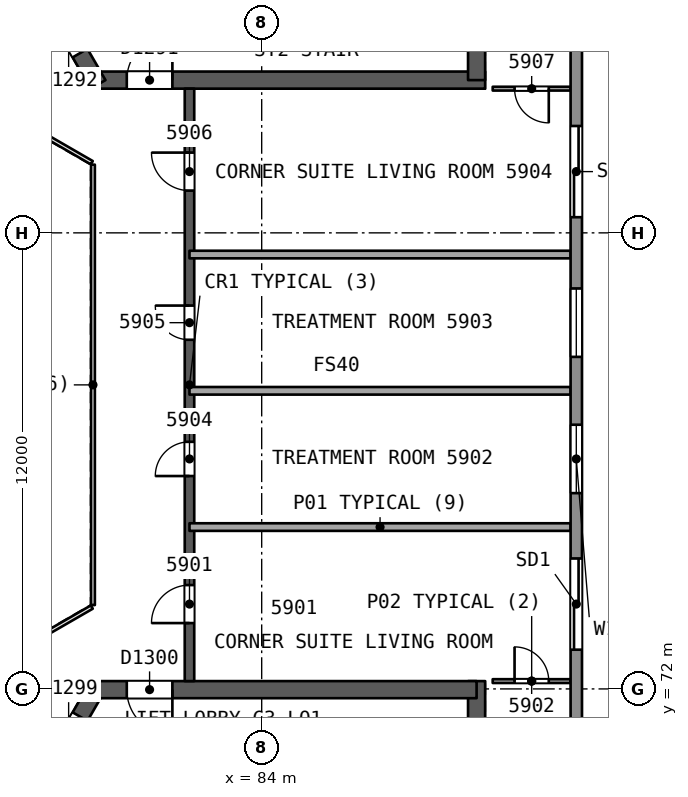
"""IFC4 building model, lengths in metres.
Left out: names, types, materials, properties, quantities, classifications, styles, units other than length and angle.
Written with IfcOpenShell. Run it as: python <this file> out.ifc"""

import sys

from ifc_helpers import new_model, si_unit, direction, frame, frame_2d, origin, place, context, subcontext, project, spatial, rectangle, extrude, element, fill, save


model = new_model("IFC4")
c1 = context("Model", 3, precision=1e-05, world=origin(), true_north=direction((0.0, 1.0)))
c2 = subcontext(c1, "Body", "Model", "MODEL_VIEW")
j1 = project(units=[si_unit("LENGTHUNIT", "METRE"), si_unit("PLANEANGLEUNIT", "RADIAN")], contexts=[c1])
p1 = place(None, origin())
s1 = spatial("IfcSite", under=j1, at=p1, CompositionType="ELEMENT")
p2 = place(p1, origin())
s2 = spatial("IfcBuilding", under=s1, at=p2, CompositionType="ELEMENT")
p3 = place(p2, frame((0.0, 0.0, 239.1)))
s3 = spatial("IfcBuildingStorey", under=s2, at=p3, CompositionType="ELEMENT", Elevation=239.1)
p4 = place(p3, frame((79.63, 88.019, 0.0), z_axis=(0.0, 0.0, 1.0), x_axis=(1.0, 0.0, 0.0)))
e1 = element("IfcWall", 1, at=p4, inside=s3, PredefinedType="SHEAR", context=c2, shape_type="SweptSolid", body=[
    extrude(rectangle(XDim=10.25, YDim=0.45, at=frame_2d((5.125, 0.0))), origin(), (0.0, 0.0, 1.0), 3.7),
])
p5 = place(p4, frame((0.82, 0.0, 0.0)))
e2 = element("IfcOpeningElement", 2, at=p5, cuts=e1, PredefinedType="OPENING", context=c2, shape_type="SweptSolid", body=[
    extrude(rectangle(XDim=1.2, YDim=2.1, at=frame_2d((0.6, 1.05))), frame((0.0, 0.235, 0.0), z_axis=(0.0, -1.0, 0.0), x_axis=(1.0, 0.0, 0.0)), (0.0, 0.0, 1.0), 0.471),
])
p6 = place(p3, frame((89.655, 88.019, 0.0), z_axis=(0.0, 0.0, 1.0), x_axis=(0.0, 1.0, 0.0)))
e3 = element("IfcWall", 3, at=p6, inside=s3, PredefinedType="SHEAR", context=c2, shape_type="SweptSolid", body=[
    extrude(rectangle(XDim=14.108, YDim=0.45, at=frame_2d((7.054, 0.0))), origin(), (0.0, 0.0, 1.0), 3.7),
])
p7 = place(p3, frame((74.617, 96.701, 0.0), z_axis=(0.0, 0.0, 1.0), x_axis=(0.499994385119, -0.866028645513, 0.0)))
e4 = element("IfcWall", 4, at=p7, inside=s3, PredefinedType="SHEAR", context=c2, shape_type="SweptSolid", body=[
    extrude(rectangle(XDim=10.155, YDim=0.45, at=frame_2d((5.077, 0.0))), origin(), (0.0, 0.0, 1.0), 3.7),
])
p8 = place(p7, frame((8.005, 0.0, 0.0)))
e5 = element("IfcOpeningElement", 5, at=p8, cuts=e4, PredefinedType="OPENING", context=c2, shape_type="SweptSolid", body=[
    extrude(rectangle(XDim=1.2, YDim=2.1, at=frame_2d((0.6, 1.05))), frame((0.0, 0.235, 0.0), z_axis=(0.0, -1.0, 0.0), x_axis=(1.0, 0.0, 0.0)), (0.0, 0.0, 1.0), 0.471),
])
p9 = place(p3, frame((79.63, 71.981, 0.0), z_axis=(0.0, 0.0, 1.0), x_axis=(-0.500002171595, -0.86602415001, 0.0)))
e6 = element("IfcWall", 6, at=p9, inside=s3, PredefinedType="SHEAR", context=c2, shape_type="SweptSolid", body=[
    extrude(rectangle(XDim=10.25, YDim=0.45, at=frame_2d((5.125, 0.0))), origin(), (0.0, 0.0, 1.0), 3.7),
])
p10 = place(p9, frame((0.82, 0.0, 0.0)))
e7 = element("IfcOpeningElement", 7, at=p10, cuts=e6, PredefinedType="OPENING", context=c2, shape_type="SweptSolid", body=[
    extrude(rectangle(XDim=1.2, YDim=2.1, at=frame_2d((0.6, 1.05))), frame((0.0, 0.235, 0.0), z_axis=(0.0, -1.0, 0.0), x_axis=(1.0, 0.0, 0.0)), (0.0, 0.0, 1.0), 0.471),
])
p11 = place(p3, frame((89.655, 58.002, 0.0), z_axis=(0.0, 0.0, 1.0), x_axis=(0.0, 1.0, 0.0)))
e8 = element("IfcWall", 8, at=p11, inside=s3, PredefinedType="SHEAR", context=c2, shape_type="SweptSolid", body=[
    extrude(rectangle(XDim=14.204, YDim=0.45, at=frame_2d((7.102, 0.0))), origin(), (0.0, 0.0, 1.0), 3.7),
])
p12 = place(p3, frame((89.655, 71.981, 0.0), z_axis=(0.0, 0.0, 1.0), x_axis=(-1.0, 0.0, 0.0)))
e9 = element("IfcWall", 9, at=p12, inside=s3, PredefinedType="SHEAR", context=c2, shape_type="SweptSolid", body=[
    extrude(rectangle(XDim=10.155, YDim=0.45, at=frame_2d((5.078, 0.0))), origin(), (0.0, 0.0, 1.0), 3.7),
])
p13 = place(p12, frame((8.005, 0.0, 0.0)))
e10 = element("IfcOpeningElement", 10, at=p13, cuts=e9, PredefinedType="OPENING", context=c2, shape_type="SweptSolid", body=[
    extrude(rectangle(XDim=1.2, YDim=2.1, at=frame_2d((0.6, 1.05))), frame((0.0, 0.235, 0.0), z_axis=(0.0, -1.0, 0.0), x_axis=(1.0, 0.0, 0.0)), (0.0, 0.0, 1.0), 0.471),
])
p14 = place(p3, frame((82.1, 72.206, 0.0), z_axis=(0.0, 0.0, 1.0), x_axis=(0.0, 1.0, 0.0)))
e11 = element("IfcWall", 11, at=p14, inside=s3, PredefinedType="SHEAR", context=c2, shape_type="SweptSolid", body=[
    extrude(rectangle(XDim=15.588, YDim=0.25, at=frame_2d((7.794, 0.0))), origin(), (0.0, 0.0, 1.0), 3.3),
])
p15 = place(p14, frame((1.527, 0.0, 0.0)))
e12 = element("IfcOpeningElement", 12, at=p15, cuts=e11, PredefinedType="OPENING", context=c2, shape_type="SweptSolid", body=[
    extrude(rectangle(XDim=1.0, YDim=2.1, at=frame_2d((0.5, 1.05))), frame((0.0, 0.135, 0.0), z_axis=(0.0, -1.0, 0.0), x_axis=(1.0, 0.0, 0.0)), (0.0, 0.0, 1.0), 0.271),
])
p16 = place(p14, frame((5.396, 0.0, 0.0)))
e13 = element("IfcOpeningElement", 13, at=p16, cuts=e11, PredefinedType="OPENING", context=c2, shape_type="SweptSolid", body=[
    extrude(rectangle(XDim=0.9, YDim=2.1, at=frame_2d((0.45, 1.05))), frame((0.0, 0.135, 0.0), z_axis=(0.0, -1.0, 0.0), x_axis=(1.0, 0.0, 0.0)), (0.0, 0.0, 1.0), 0.271),
])
p17 = place(p14, frame((8.981, 0.0, 0.0)))
e14 = element("IfcOpeningElement", 14, at=p17, cuts=e11, PredefinedType="OPENING", context=c2, shape_type="SweptSolid", body=[
    extrude(rectangle(XDim=0.9, YDim=2.1, at=frame_2d((0.45, 1.05))), frame((0.0, 0.135, 0.0), z_axis=(0.0, -1.0, 0.0), x_axis=(1.0, 0.0, 0.0)), (0.0, 0.0, 1.0), 0.271),
])
p18 = place(p14, frame((12.906, 0.0, 0.0)))
e15 = element("IfcOpeningElement", 15, at=p18, cuts=e11, PredefinedType="OPENING", context=c2, shape_type="SweptSolid", body=[
    extrude(rectangle(XDim=1.0, YDim=2.1, at=frame_2d((0.5, 1.05))), frame((0.0, 0.135, 0.0), z_axis=(0.0, -1.0, 0.0), x_axis=(1.0, 0.0, 0.0)), (0.0, 0.0, 1.0), 0.271),
])
p19 = place(p3, frame((90.079, 72.206, 0.0), z_axis=(0.0, 0.0, 1.0), x_axis=(1.0, 0.0, 0.0)))
e16 = element("IfcWall", 16, at=p19, inside=s3, PredefinedType="PARTITIONING", context=c2, shape_type="SweptSolid", body=[
    extrude(rectangle(XDim=2.05, YDim=0.1, at=frame_2d((1.025, 0.0))), origin(), (0.0, 0.0, 1.0), 3.3),
])
p20 = place(p19, frame((0.575, 0.0, 0.0)))
e17 = element("IfcOpeningElement", 17, at=p20, cuts=e16, PredefinedType="OPENING", context=c2, shape_type="SweptSolid", body=[
    extrude(rectangle(XDim=0.9, YDim=2.1, at=frame_2d((0.45, 1.05))), frame((0.0, 0.061, 0.0), z_axis=(0.0, -1.0, 0.0), x_axis=(1.0, 0.0, 0.0)), (0.0, 0.0, 1.0), 0.121),
])
for number, where, z_axis, x_axis in (
    (18, (92.129, 76.259, 0.0), (0.0, 0.0, 1.0), (-1.0, 0.0, 0.0)),
    (19, (92.129, 79.844, 0.0), (0.0, 0.0, 1.0), (-1.0, 0.0, 0.0)),
    (20, (92.129, 83.429, 0.0), (0.0, 0.0, 1.0), (-1.0, 0.0, 0.0)),
):
    element("IfcWall", number, at=place(p3, frame(where, z_axis=z_axis, x_axis=x_axis)), inside=s3, PredefinedType="PARTITIONING", context=c2, shape_type="SweptSolid", body=[
        extrude(rectangle(XDim=10.029, YDim=0.2, at=frame_2d((5.015, 0.0))), origin(), (0.0, 0.0, 1.0), 3.3),
    ])
p21 = place(p3, frame((92.129, 87.794, 0.0), z_axis=(0.0, 0.0, 1.0), x_axis=(-1.0, 0.0, 0.0)))
e21 = element("IfcWall", 21, at=p21, inside=s3, PredefinedType="PARTITIONING", context=c2, shape_type="SweptSolid", body=[
    extrude(rectangle(XDim=2.05, YDim=0.1, at=frame_2d((1.025, 0.0))), origin(), (0.0, 0.0, 1.0), 3.3),
])
p22 = place(p21, frame((0.575, 0.0, 0.0)))
e22 = element("IfcOpeningElement", 22, at=p22, cuts=e21, PredefinedType="OPENING", context=c2, shape_type="SweptSolid", body=[
    extrude(rectangle(XDim=0.9, YDim=2.1, at=frame_2d((0.45, 1.05))), frame((0.0, 0.061, 0.0), z_axis=(0.0, -1.0, 0.0), x_axis=(1.0, 0.0, 0.0)), (0.0, 0.0, 1.0), 0.121),
])
p23 = place(p3, frame((92.279, 104.844, 0.0), z_axis=(0.0, 0.0, 1.0), x_axis=(0.0, -1.0, 0.0)))
e23 = element("IfcWall", 23, at=p23, inside=s3, PredefinedType="SOLIDWALL", context=c2, shape_type="SweptSolid", body=[
    extrude(rectangle(XDim=49.688, YDim=0.3, at=frame_2d((24.844, 0.0))), origin(), (0.0, 0.0, 1.0), 3.3),
])
p24 = place(p23, frame((29.412, 0.0, 0.0)))
e24 = element("IfcOpeningElement", 24, at=p24, cuts=e23, PredefinedType="OPENING", context=c2, shape_type="SweptSolid", body=[
    extrude(rectangle(XDim=2.4, YDim=2.4, at=frame_2d((1.2, 1.2))), frame((0.0, 0.161, 0.0), z_axis=(0.0, -1.0, 0.0), x_axis=(1.0, 0.0, 0.0)), (0.0, 0.0, 1.0), 0.321),
])
p25 = place(p23, frame((38.973, 0.0, 0.0)))
e25 = element("IfcOpeningElement", 25, at=p25, cuts=e23, PredefinedType="OPENING", context=c2, shape_type="SweptSolid", body=[
    extrude(rectangle(XDim=2.4, YDim=2.4, at=frame_2d((1.2, 1.2))), frame((0.0, 0.161, 0.0), z_axis=(0.0, -1.0, 0.0), x_axis=(1.0, 0.0, 0.0)), (0.0, 0.0, 1.0), 0.321),
])
p26 = place(p23, frame((18.032, 0.0, 0.0)))
e26 = element("IfcOpeningElement", 26, at=p26, cuts=e23, PredefinedType="OPENING", context=c2, shape_type="SweptSolid", body=[
    extrude(rectangle(XDim=2.4, YDim=2.4, at=frame_2d((1.2, 1.2))), frame((0.0, 0.161, 0.0), z_axis=(0.0, -1.0, 0.0), x_axis=(1.0, 0.0, 0.0)), (0.0, 0.0, 1.0), 0.321),
])
p27 = place(p23, frame((8.341, 0.0, 0.0)))
e27 = element("IfcOpeningElement", 27, at=p27, cuts=e23, PredefinedType="OPENING", context=c2, shape_type="SweptSolid", body=[
    extrude(rectangle(XDim=2.4, YDim=2.4, at=frame_2d((1.2, 1.2))), frame((0.0, 0.161, 0.0), z_axis=(0.0, -1.0, 0.0), x_axis=(1.0, 0.0, 0.0)), (0.0, 0.0, 1.0), 0.321),
])
p28 = place(p23, frame((25.893, 0.0, 0.9)))
e28 = element("IfcOpeningElement", 28, at=p28, cuts=e23, PredefinedType="OPENING", context=c2, shape_type="SweptSolid", body=[
    extrude(rectangle(XDim=1.8, YDim=1.5, at=frame_2d((0.9, 0.75))), frame((0.0, 0.161, 0.0), z_axis=(0.0, -1.0, 0.0), x_axis=(1.0, 0.0, 0.0)), (0.0, 0.0, 1.0), 0.321),
])
p29 = place(p23, frame((22.307, 0.0, 0.9)))
e29 = element("IfcOpeningElement", 29, at=p29, cuts=e23, PredefinedType="OPENING", context=c2, shape_type="SweptSolid", body=[
    extrude(rectangle(XDim=1.8, YDim=1.5, at=frame_2d((0.9, 0.75))), frame((0.0, 0.161, 0.0), z_axis=(0.0, -1.0, 0.0), x_axis=(1.0, 0.0, 0.0)), (0.0, 0.0, 1.0), 0.321),
])
p30 = place(p3, frame((44.845, 82.542, 0.0), z_axis=(0.0, 0.0, 1.0), x_axis=(0.866025459945, 0.499999902727, 0.0)))
e30 = element("IfcWall", 30, at=p30, inside=s3, PredefinedType="SOLIDWALL", context=c2, shape_type="SweptSolid", body=[
    extrude(rectangle(XDim=49.688, YDim=0.3, at=frame_2d((24.844, 0.0))), origin(), (0.0, 0.0, 1.0), 3.3),
])
p31 = place(p30, frame((23.8, 0.0, 0.0)))
e31 = element("IfcOpeningElement", 31, at=p31, cuts=e30, PredefinedType="OPENING", context=c2, shape_type="SweptSolid", body=[
    extrude(rectangle(XDim=2.4, YDim=2.4, at=frame_2d((1.2, 1.2))), frame((0.0, 0.161, 0.0), z_axis=(0.0, -1.0, 0.0), x_axis=(1.0, 0.0, 0.0)), (0.0, 0.0, 1.0), 0.321),
])
p32 = place(p30, frame((10.243, 0.0, 0.0)))
e32 = element("IfcOpeningElement", 32, at=p32, cuts=e30, PredefinedType="OPENING", context=c2, shape_type="SweptSolid", body=[
    extrude(rectangle(XDim=2.4, YDim=2.4, at=frame_2d((1.2, 1.2))), frame((0.0, 0.161, 0.0), z_axis=(0.0, -1.0, 0.0), x_axis=(1.0, 0.0, 0.0)), (0.0, 0.0, 1.0), 0.321),
])
p33 = place(p30, frame((37.201, 0.0, 0.0)))
e33 = element("IfcOpeningElement", 33, at=p33, cuts=e30, PredefinedType="OPENING", context=c2, shape_type="SweptSolid", body=[
    extrude(rectangle(XDim=2.4, YDim=2.4, at=frame_2d((1.2, 1.2))), frame((0.0, 0.161, 0.0), z_axis=(0.0, -1.0, 0.0), x_axis=(1.0, 0.0, 0.0)), (0.0, 0.0, 1.0), 0.321),
])
p34 = place(p3, frame((87.876, 52.614, 0.0), z_axis=(0.0, 0.0, 1.0), x_axis=(-0.866025459945, 0.499999902727, 0.0)))
e34 = element("IfcWall", 34, at=p34, inside=s3, PredefinedType="SOLIDWALL", context=c2, shape_type="SweptSolid", body=[
    extrude(rectangle(XDim=49.688, YDim=0.3, at=frame_2d((24.844, 0.0))), origin(), (0.0, 0.0, 1.0), 3.3),
])
p35 = place(p34, frame((23.956, 0.0, 0.0)))
e35 = element("IfcOpeningElement", 35, at=p35, cuts=e34, PredefinedType="OPENING", context=c2, shape_type="SweptSolid", body=[
    extrude(rectangle(XDim=2.4, YDim=2.4, at=frame_2d((1.2, 1.2))), frame((0.0, 0.161, 0.0), z_axis=(0.0, -1.0, 0.0), x_axis=(1.0, 0.0, 0.0)), (0.0, 0.0, 1.0), 0.321),
])
p36 = place(p34, frame((37.357, 0.0, 0.0)))
e36 = element("IfcOpeningElement", 36, at=p36, cuts=e34, PredefinedType="OPENING", context=c2, shape_type="SweptSolid", body=[
    extrude(rectangle(XDim=2.4, YDim=2.4, at=frame_2d((1.2, 1.2))), frame((0.0, 0.161, 0.0), z_axis=(0.0, -1.0, 0.0), x_axis=(1.0, 0.0, 0.0)), (0.0, 0.0, 1.0), 0.321),
])
p37 = place(p34, frame((10.243, 0.0, 0.0)))
e37 = element("IfcOpeningElement", 37, at=p37, cuts=e34, PredefinedType="OPENING", context=c2, shape_type="SweptSolid", body=[
    extrude(rectangle(XDim=2.4, YDim=2.4, at=frame_2d((1.2, 1.2))), frame((0.0, 0.161, 0.0), z_axis=(0.0, -1.0, 0.0), x_axis=(1.0, 0.0, 0.0)), (0.0, 0.0, 1.0), 0.321),
])
p38 = place(p3, frame((79.56, 74.206, 0.0), z_axis=(0.0, 0.0, 1.0), x_axis=(0.0, 1.0, 0.0)))
e38 = element("IfcWall", 38, at=p38, inside=s3, PredefinedType="PARTITIONING", context=c2, shape_type="SweptSolid", body=[
    extrude(rectangle(XDim=11.588, YDim=0.1, at=frame_2d((5.794, 0.0))), origin(), (0.0, 0.0, 1.0), 3.3),
])
for number, where, z_axis, x_axis in (
    (39, (79.53, 85.846, 0.0), (0.0, 0.0, 1.0), (-0.866, 0.5, 0.0)),
    (40, (77.798, 73.154, 0.0), (0.0, 0.0, 1.0), (0.866, 0.5, 0.0)),
):
    element("IfcWall", number, at=place(p3, frame(where, z_axis=z_axis, x_axis=x_axis)), inside=s3, PredefinedType="PARTITIONING", context=c2, shape_type="SweptSolid", body=[
        extrude(rectangle(XDim=2.0, YDim=0.1, at=frame_2d((1.0, 0.0))), origin(), (0.0, 0.0, 1.0), 3.3),
    ])
p39 = place(p15, origin())
e41 = element("IfcDoor", 41, at=p39, inside=s3, OperationType="SINGLE_SWING_LEFT", PredefinedType="NOTDEFINED", context=c2, shape_type="SweptSolid", body=[
    extrude(rectangle(XDim=1.0, YDim=2.1, at=frame_2d((0.5, 1.05))), frame((0.0, 0.025, 0.0), z_axis=(0.0, -1.0, 0.0), x_axis=(1.0, 0.0, 0.0)), (0.0, 0.0, 1.0), 0.05),
])
fill(e12, e41)
p40 = place(p20, origin())
e42 = element("IfcDoor", 42, at=p40, inside=s3, OperationType="SINGLE_SWING_LEFT", PredefinedType="NOTDEFINED", context=c2, shape_type="SweptSolid", body=[
    extrude(rectangle(XDim=0.9, YDim=2.1, at=frame_2d((0.45, 1.05))), frame((0.0, 0.025, 0.0), z_axis=(0.0, -1.0, 0.0), x_axis=(1.0, 0.0, 0.0)), (0.0, 0.0, 1.0), 0.05),
])
fill(e17, e42)
p41 = place(p16, origin())
e43 = element("IfcDoor", 43, at=p41, inside=s3, OperationType="SINGLE_SWING_LEFT", PredefinedType="NOTDEFINED", context=c2, shape_type="SweptSolid", body=[
    extrude(rectangle(XDim=0.9, YDim=2.1, at=frame_2d((0.45, 1.05))), frame((0.0, 0.025, 0.0), z_axis=(0.0, -1.0, 0.0), x_axis=(1.0, 0.0, 0.0)), (0.0, 0.0, 1.0), 0.05),
])
fill(e13, e43)
p42 = place(p17, origin())
e44 = element("IfcDoor", 44, at=p42, inside=s3, OperationType="SINGLE_SWING_RIGHT", PredefinedType="NOTDEFINED", context=c2, shape_type="SweptSolid", body=[
    extrude(rectangle(XDim=0.9, YDim=2.1, at=frame_2d((0.45, 1.05))), frame((0.0, 0.025, 0.0), z_axis=(0.0, -1.0, 0.0), x_axis=(1.0, 0.0, 0.0)), (0.0, 0.0, 1.0), 0.05),
])
fill(e14, e44)
p43 = place(p18, origin())
e45 = element("IfcDoor", 45, at=p43, inside=s3, OperationType="SINGLE_SWING_RIGHT", PredefinedType="NOTDEFINED", context=c2, shape_type="SweptSolid", body=[
    extrude(rectangle(XDim=1.0, YDim=2.1, at=frame_2d((0.5, 1.05))), frame((0.0, 0.025, 0.0), z_axis=(0.0, -1.0, 0.0), x_axis=(1.0, 0.0, 0.0)), (0.0, 0.0, 1.0), 0.05),
])
fill(e15, e45)
p44 = place(p22, origin())
e46 = element("IfcDoor", 46, at=p44, inside=s3, OperationType="SINGLE_SWING_LEFT", PredefinedType="NOTDEFINED", context=c2, shape_type="SweptSolid", body=[
    extrude(rectangle(XDim=0.9, YDim=2.1, at=frame_2d((0.45, 1.05))), frame((0.0, 0.025, 0.0), z_axis=(0.0, -1.0, 0.0), x_axis=(1.0, 0.0, 0.0)), (0.0, 0.0, 1.0), 0.05),
])
fill(e22, e46)
p45 = place(p24, origin())
e47 = element("IfcDoor", 47, at=p45, inside=s3, OperationType="SLIDING_TO_LEFT", PredefinedType="NOTDEFINED", context=c2, shape_type="SweptSolid", body=[
    extrude(rectangle(XDim=2.4, YDim=2.4, at=frame_2d((1.2, 1.2))), frame((0.0, 0.025, 0.0), z_axis=(0.0, -1.0, 0.0), x_axis=(1.0, 0.0, 0.0)), (0.0, 0.0, 1.0), 0.05),
])
fill(e24, e47)
p46 = place(p26, origin())
e48 = element("IfcDoor", 48, at=p46, inside=s3, OperationType="SLIDING_TO_LEFT", PredefinedType="NOTDEFINED", context=c2, shape_type="SweptSolid", body=[
    extrude(rectangle(XDim=2.4, YDim=2.4, at=frame_2d((1.2, 1.2))), frame((0.0, 0.025, 0.0), z_axis=(0.0, -1.0, 0.0), x_axis=(1.0, 0.0, 0.0)), (0.0, 0.0, 1.0), 0.05),
])
fill(e26, e48)
p47 = place(p28, origin())
e49 = element("IfcWindow", 49, at=p47, inside=s3, PartitioningType="SINGLE_PANEL", PredefinedType="WINDOW", context=c2, shape_type="SweptSolid", body=[
    extrude(rectangle(XDim=1.8, YDim=1.5, at=frame_2d((0.9, 0.75))), frame((0.0, 0.03, 0.0), z_axis=(0.0, -1.0, 0.0), x_axis=(1.0, 0.0, 0.0)), (0.0, 0.0, 1.0), 0.06),
])
fill(e28, e49)
p48 = place(p29, origin())
e50 = element("IfcWindow", 50, at=p48, inside=s3, PartitioningType="SINGLE_PANEL", PredefinedType="WINDOW", context=c2, shape_type="SweptSolid", body=[
    extrude(rectangle(XDim=1.8, YDim=1.5, at=frame_2d((0.9, 0.75))), frame((0.0, 0.03, 0.0), z_axis=(0.0, -1.0, 0.0), x_axis=(1.0, 0.0, 0.0)), (0.0, 0.0, 1.0), 0.06),
])
fill(e29, e50)
p49 = place(p5, origin())
e51 = element("IfcDoor", 51, at=p49, inside=s3, OperationType="SINGLE_SWING_RIGHT", PredefinedType="NOTDEFINED", context=c2, shape_type="SweptSolid", body=[
    extrude(rectangle(XDim=1.2, YDim=2.1, at=frame_2d((0.6, 1.05))), frame((0.0, 0.025, 0.0), z_axis=(0.0, -1.0, 0.0), x_axis=(1.0, 0.0, 0.0)), (0.0, 0.0, 1.0), 0.05),
])
fill(e2, e51)
p50 = place(p8, origin())
e52 = element("IfcDoor", 52, at=p50, inside=s3, OperationType="SINGLE_SWING_LEFT", PredefinedType="NOTDEFINED", context=c2, shape_type="SweptSolid", body=[
    extrude(rectangle(XDim=1.2, YDim=2.1, at=frame_2d((0.6, 1.05))), frame((0.0, 0.025, 0.0), z_axis=(0.0, -1.0, 0.0), x_axis=(1.0, 0.0, 0.0)), (0.0, 0.0, 1.0), 0.05),
])
fill(e5, e52)
p51 = place(p10, origin())
e53 = element("IfcDoor", 53, at=p51, inside=s3, OperationType="SINGLE_SWING_RIGHT", PredefinedType="NOTDEFINED", context=c2, shape_type="SweptSolid", body=[
    extrude(rectangle(XDim=1.2, YDim=2.1, at=frame_2d((0.6, 1.05))), frame((0.0, 0.025, 0.0), z_axis=(0.0, -1.0, 0.0), x_axis=(1.0, 0.0, 0.0)), (0.0, 0.0, 1.0), 0.05),
])
fill(e7, e53)
p52 = place(p13, origin())
e54 = element("IfcDoor", 54, at=p52, inside=s3, OperationType="SINGLE_SWING_LEFT", PredefinedType="NOTDEFINED", context=c2, shape_type="SweptSolid", body=[
    extrude(rectangle(XDim=1.2, YDim=2.1, at=frame_2d((0.6, 1.05))), frame((0.0, 0.025, 0.0), z_axis=(0.0, -1.0, 0.0), x_axis=(1.0, 0.0, 0.0)), (0.0, 0.0, 1.0), 0.05),
])
fill(e10, e54)
save(model, sys.argv[1])
